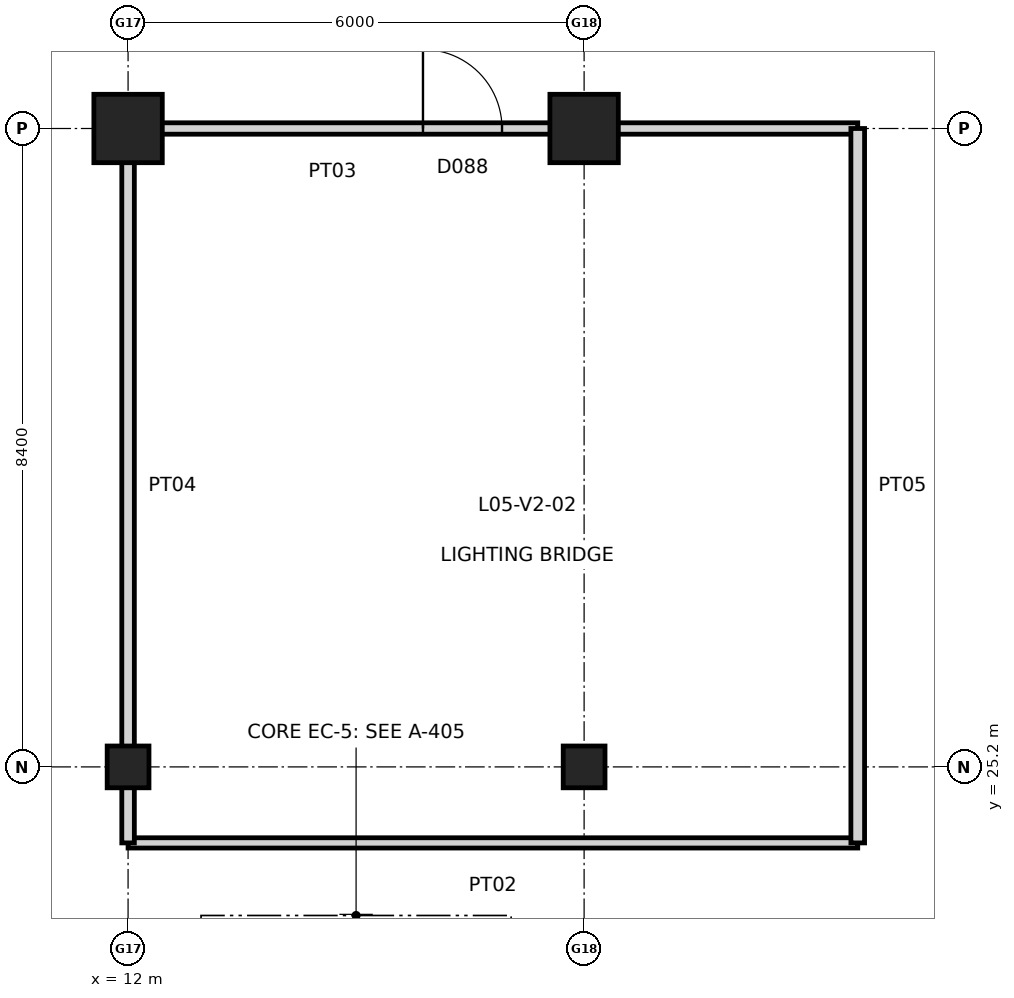
"""IFC4 building model, lengths in metres.
Left out: names, types, materials, properties, quantities, classifications, styles, units other than length and angle.
Written with IfcOpenShell. Run it as: python <this file> out.ifc"""

import sys

from ifc_helpers import new_model, si_unit, direction, frame, frame_2d, origin, origin_2d, place, context, subcontext, project, spatial, rectangle, extrude, element, fill, save


model = new_model("IFC4")
c1 = context("Model", 3, precision=1e-05, world=origin(), true_north=direction((0.0, 1.0)))
c2 = subcontext(c1, "Body", "Model", "MODEL_VIEW")
j1 = project(units=[si_unit("LENGTHUNIT", "METRE"), si_unit("PLANEANGLEUNIT", "RADIAN")], contexts=[c1])
p1 = place(None, origin())
s1 = spatial("IfcSite", under=j1, at=p1, CompositionType="ELEMENT")
p2 = place(p1, origin())
s2 = spatial("IfcBuilding", under=s1, at=p2, CompositionType="ELEMENT")
p3 = place(p2, frame((0.0, 0.0, 24.6)))
s3 = spatial("IfcBuildingStorey", under=s2, at=p3, CompositionType="ELEMENT", Elevation=24.6)
p4 = place(p3, frame((12.0, 25.2, 0.0), z_axis=(0.0, 0.0, 1.0), x_axis=(1.0, 0.0, 0.0)))
e1 = element("IfcColumn", 1, at=p4, inside=s3, PredefinedType="COLUMN", context=c2, shape_type="SweptSolid", body=[
    extrude(rectangle(XDim=0.55, YDim=0.55, at=origin_2d()), origin(), (0.0, 0.0, 1.0), 5.4),
])
p5 = place(p3, frame((12.0, 33.6, 0.0), z_axis=(0.0, 0.0, 1.0), x_axis=(1.0, 0.0, 0.0)))
e2 = element("IfcColumn", 2, at=p5, inside=s3, PredefinedType="COLUMN", context=c2, shape_type="SweptSolid", body=[
    extrude(rectangle(XDim=0.9, YDim=0.9, at=origin_2d()), origin(), (0.0, 0.0, 1.0), 5.4),
])
p6 = place(p3, frame((18.0, 25.2, 0.0), z_axis=(0.0, 0.0, 1.0), x_axis=(1.0, 0.0, 0.0)))
e3 = element("IfcColumn", 3, at=p6, inside=s3, PredefinedType="COLUMN", context=c2, shape_type="SweptSolid", body=[
    extrude(rectangle(XDim=0.55, YDim=0.55, at=origin_2d()), origin(), (0.0, 0.0, 1.0), 5.4),
])
p7 = place(p3, frame((18.0, 33.6, 0.0), z_axis=(0.0, 0.0, 1.0), x_axis=(1.0, 0.0, 0.0)))
e4 = element("IfcColumn", 4, at=p7, inside=s3, PredefinedType="COLUMN", context=c2, shape_type="SweptSolid", body=[
    extrude(rectangle(XDim=0.9, YDim=0.9, at=origin_2d()), origin(), (0.0, 0.0, 1.0), 5.4),
])
p8 = place(p3, frame((12.0, 24.2, 0.0), z_axis=(0.0, 0.0, 1.0), x_axis=(1.0, 0.0, 0.0)))
e5 = element("IfcWall", 5, at=p8, inside=s3, PredefinedType="PARTITIONING", context=c2, shape_type="SweptSolid", body=[
    extrude(rectangle(XDim=9.6, YDim=0.135, at=frame_2d((4.8, 0.0))), origin(), (0.0, 0.0, 1.0), 5.02),
])
p9 = place(p3, frame((12.0, 33.6, 0.0), z_axis=(0.0, 0.0, 1.0), x_axis=(1.0, 0.0, 0.0)))
e6 = element("IfcWall", 6, at=p9, inside=s3, PredefinedType="PARTITIONING", context=c2, shape_type="SweptSolid", body=[
    extrude(rectangle(XDim=9.6, YDim=0.15, at=frame_2d((4.8, 0.0))), origin(), (0.0, 0.0, 1.0), 4.412),
])
p10 = place(p9, frame((3.88, 0.0, 0.0)))
e7 = element("IfcOpeningElement", 7, at=p10, cuts=e6, PredefinedType="OPENING", context=c2, shape_type="SweptSolid", body=[
    extrude(rectangle(XDim=1.04, YDim=2.2, at=frame_2d((0.52, 1.1))), frame((0.0, 0.085, 0.0), z_axis=(0.0, -1.0, 0.0), x_axis=(1.0, 0.0, 0.0)), (0.0, 0.0, 1.0), 0.17),
])
p11 = place(p3, frame((12.0, 24.2, 0.0), z_axis=(0.0, 0.0, 1.0), x_axis=(0.0, 1.0, 0.0)))
e8 = element("IfcWall", 8, at=p11, inside=s3, PredefinedType="PARTITIONING", context=c2, shape_type="SweptSolid", body=[
    extrude(rectangle(XDim=9.4, YDim=0.165, at=frame_2d((4.7, 0.0))), origin(), (0.0, 0.0, 1.0), 4.19),
])
p12 = place(p3, frame((21.6, 24.2, 0.0), z_axis=(0.0, 0.0, 1.0), x_axis=(0.0, 1.0, 0.0)))
e9 = element("IfcWall", 9, at=p12, inside=s3, PredefinedType="PARTITIONING", context=c2, shape_type="SweptSolid", body=[
    extrude(rectangle(XDim=9.4, YDim=0.18, at=frame_2d((4.7, 0.0))), origin(), (0.0, 0.0, 1.0), 5.02),
])
p13 = place(p10, origin())
e10 = element("IfcDoor", 10, at=p13, inside=s3, OperationType="SINGLE_SWING_LEFT", PredefinedType="DOOR", context=c2, shape_type="SweptSolid", body=[
    extrude(rectangle(XDim=1.04, YDim=2.2, at=frame_2d((0.52, 1.1))), frame((0.0, 0.025, 0.0), z_axis=(0.0, -1.0, 0.0), x_axis=(1.0, 0.0, 0.0)), (0.0, 0.0, 1.0), 0.05),
])
fill(e7, e10)
save(model, sys.argv[1])
